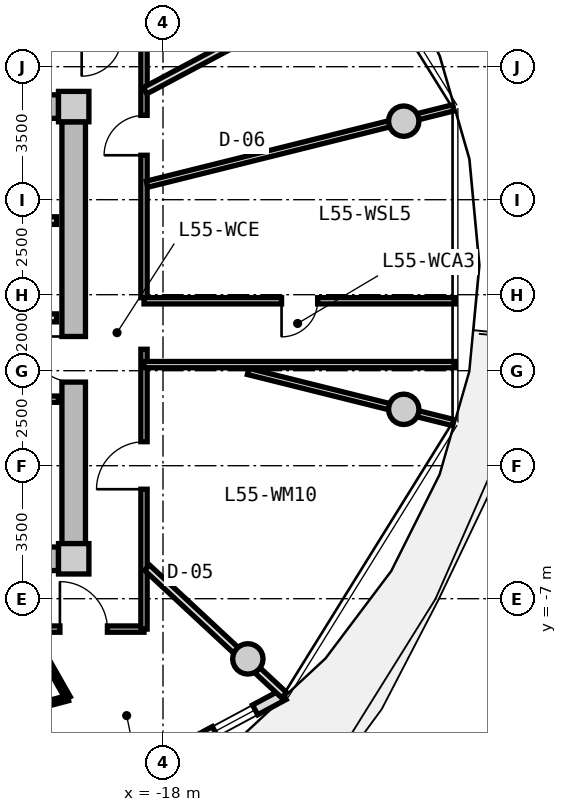
"""IFC4 building model, lengths in metres.
Left out: names, types, materials, properties, quantities, classifications, styles, units other than length and angle.
Written with IfcOpenShell. Run it as: python <this file> out.ifc"""

import sys

from ifc_helpers import new_model, si_unit, direction, frame, frame_2d, origin, origin_2d, place, context, subcontext, project, spatial, rectangle, circle, extrude, source, transform, mapped, element, fill, save


model = new_model("IFC4")
c1 = context("Model", 3, precision=1e-05, world=origin(), true_north=direction((0.0, 1.0)))
c2 = subcontext(c1, "Body", "Model", "MODEL_VIEW")
j1 = project(units=[si_unit("LENGTHUNIT", "METRE"), si_unit("PLANEANGLEUNIT", "RADIAN")], contexts=[c1])
p1 = place(None, origin())
s1 = spatial("IfcSite", under=j1, at=p1, CompositionType="ELEMENT")
p2 = place(p1, origin())
s2 = spatial("IfcBuilding", under=s1, at=p2, CompositionType="ELEMENT")
p3 = place(p2, frame((0.0, 0.0, 177.0)))
s3 = spatial("IfcBuildingStorey", under=s2, at=p3, CompositionType="ELEMENT", Elevation=177.0)
m1 = source(origin(), c2, "Body", "SweptSolid", [
    extrude(rectangle(XDim=0.8, YDim=0.8, at=origin_2d()), origin(), (0.0, 0.0, 1.0), 3.05),
])
for number, where, z_axis, x_axis in (
    (1, (-20.35, -5.95, 0.0), (0.0, 0.0, 1.0), (1.0, 0.0, 0.0)),
    (2, (-20.35, 5.95, 0.0), (0.0, 0.0, 1.0), (1.0, 0.0, 0.0)),
):
    element("IfcColumn", number, at=place(p3, frame(where, z_axis=z_axis, x_axis=x_axis)), inside=s3, PredefinedType="COLUMN", context=c2, shape_type="MappedRepresentation", body=[
        mapped(m1, transform((0.0, 0.0, 0.0), x_axis=(1.0, 0.0, 0.0), y_axis=(0.0, 1.0, 0.0), z_axis=(0.0, 0.0, 1.0), scale=1.0)),
    ])
m2 = source(origin(), c2, "Body", "SweptSolid", [
    extrude(rectangle(XDim=14.5, YDim=0.62, at=frame_2d((7.25, 0.0))), origin(), (0.0, 0.0, 1.0), 2.81),
])
for number, where, z_axis, x_axis in (
    (3, (-35.25, 5.95, 0.0), (0.0, 0.0, 1.0), (1.0, 0.0, 0.0)),
    (4, (-20.75, -5.95, 0.0), (0.0, 0.0, 1.0), (-1.0, 0.0, 0.0)),
):
    element("IfcWall", number, at=place(p3, frame(where, z_axis=z_axis, x_axis=x_axis)), inside=s3, PredefinedType="SHEAR", context=c2, shape_type="MappedRepresentation", body=[
        mapped(m2, transform((0.0, 0.0, 0.0), x_axis=(1.0, 0.0, 0.0), y_axis=(0.0, 1.0, 0.0), z_axis=(0.0, 0.0, 1.0), scale=1.0)),
    ])
m3 = source(origin(), c2, "Body", "SweptSolid", [
    extrude(rectangle(XDim=11.1, YDim=0.62, at=frame_2d((5.55, 0.0))), origin(), (0.0, 0.0, 1.0), 2.81),
])
p4 = place(p3, frame((-20.35, 5.55, 0.0), z_axis=(0.0, 0.0, 1.0), x_axis=(0.0, -1.0, 0.0)))
e5 = element("IfcWall", 5, at=p4, inside=s3, PredefinedType="SHEAR", context=c2, shape_type="MappedRepresentation", body=[
    mapped(m3, transform((0.0, 0.0, 0.0), x_axis=(1.0, 0.0, 0.0), y_axis=(0.0, 1.0, 0.0), z_axis=(0.0, 0.0, 1.0), scale=1.0)),
])
p5 = place(p4, frame((5.65, 0.0, 0.0)))
e6 = element("IfcOpeningElement", 6, at=p5, cuts=e5, PredefinedType="OPENING", context=c2, shape_type="SweptSolid", body=[
    extrude(rectangle(XDim=1.2, YDim=2.15, at=frame_2d((0.6, 1.075))), frame((0.0, 0.32, 0.0), z_axis=(0.0, -1.0, 0.0), x_axis=(1.0, 0.0, 0.0)), (0.0, 0.0, 1.0), 0.64),
])
m4 = source(origin(), c2, "Body", "SweptSolid", [
    extrude(circle(Radius=0.4, at=origin_2d()), origin(), (0.0, 0.0, 1.0), 3.05),
])
for number, where, z_axis, x_axis in (
    (7, (-11.665, 5.567, 0.0), (0.0, 0.0, 1.0), (1.0, 0.0, 0.0)),
    (8, (-15.767, -8.584, 0.0), (0.0, 0.0, 1.0), (1.0, 0.0, 0.0)),
    (9, (-11.665, -2.016, 0.0), (0.0, 0.0, 1.0), (1.0, 0.0, 0.0)),
):
    element("IfcColumn", number, at=place(p3, frame(where, z_axis=z_axis, x_axis=x_axis)), inside=s3, PredefinedType="COLUMN", context=c2, shape_type="MappedRepresentation", body=[
        mapped(m4, transform((0.0, 0.0, 0.0), x_axis=(1.0, 0.0, 0.0), y_axis=(0.0, 1.0, 0.0), z_axis=(0.0, 0.0, 1.0), scale=1.0)),
    ])
m5 = source(origin(), c2, "Body", "SweptSolid", [
    extrude(rectangle(XDim=8.742, YDim=0.29, at=frame_2d((4.371, 0.0))), origin(), (0.0, 0.0, 1.0), 2.81),
])
p6 = place(p3, frame((-14.827, -9.524, 0.0), z_axis=(0.0, 0.0, 1.0), x_axis=(-0.880998740657, -0.473118609823, 0.0)))
e10 = element("IfcWall", 10, at=p6, inside=s3, PredefinedType="SOLIDWALL", context=c2, shape_type="MappedRepresentation", body=[
    mapped(m5, transform((0.0, 0.0, 0.0), x_axis=(1.0, 0.0, 0.0), y_axis=(0.0, 1.0, 0.0), z_axis=(0.0, 0.0, 1.0), scale=1.0)),
])
p7 = place(p6, frame((6.66, 0.0, 0.0)))
e11 = element("IfcOpeningElement", 11, at=p7, cuts=e10, PredefinedType="OPENING", context=c2, shape_type="SweptSolid", body=[
    extrude(rectangle(XDim=1.15, YDim=2.25, at=frame_2d((0.575, 1.125))), frame((0.0, 0.155, 0.0), z_axis=(0.0, -1.0, 0.0), x_axis=(1.0, 0.0, 0.0)), (0.0, 0.0, 1.0), 0.31),
])
p8 = place(p6, frame((0.85, 0.0, 0.85)))
e12 = element("IfcOpeningElement", 12, at=p8, cuts=e10, PredefinedType="OPENING", context=c2, shape_type="SweptSolid", body=[
    extrude(rectangle(XDim=1.2, YDim=1.5, at=frame_2d((0.6, 0.75))), frame((0.0, 0.155, 0.0), z_axis=(0.0, -1.0, 0.0), x_axis=(1.0, 0.0, 0.0)), (0.0, 0.0, 1.0), 0.31),
])
m6 = source(origin(), c2, "Body", "SweptSolid", [
    extrude(rectangle(XDim=3.2, YDim=0.2, at=frame_2d((1.6, 0.0))), origin(), (0.0, 0.0, 1.0), 2.795),
])
p9 = place(p3, frame((-24.0, 2.95, 0.0), z_axis=(0.0, 0.0, 1.0), x_axis=(1.0, 0.0, 0.0)))
e13 = element("IfcWall", 13, at=p9, inside=s3, PredefinedType="PARTITIONING", context=c2, shape_type="MappedRepresentation", body=[
    mapped(m6, transform((0.0, 0.0, 0.0), x_axis=(1.0, 0.0, 0.0), y_axis=(0.0, 1.0, 0.0), z_axis=(0.0, 0.0, 1.0), scale=1.0)),
])
m7 = source(origin(), c2, "Body", "SweptSolid", [
    extrude(rectangle(XDim=6.66, YDim=0.21, at=frame_2d((3.33, 0.0))), origin(), (0.0, 0.0, 1.0), 2.795),
])
p10 = place(p3, frame((-27.46, 0.39, 0.0), z_axis=(0.0, 0.0, 1.0), x_axis=(1.0, 0.0, 0.0)))
e14 = element("IfcWall", 14, at=p10, inside=s3, PredefinedType="PARTITIONING", context=c2, shape_type="MappedRepresentation", body=[
    mapped(m7, transform((0.0, 0.0, 0.0), x_axis=(1.0, 0.0, 0.0), y_axis=(0.0, 1.0, 0.0), z_axis=(0.0, 0.0, 1.0), scale=1.0)),
])
p11 = place(p10, frame((1.0, 0.0, 0.0)))
e15 = element("IfcOpeningElement", 15, at=p11, cuts=e14, PredefinedType="OPENING", context=c2, shape_type="SweptSolid", body=[
    extrude(rectangle(XDim=1.2, YDim=2.15, at=frame_2d((0.6, 1.075))), frame((0.0, 0.115, 0.0), z_axis=(0.0, -1.0, 0.0), x_axis=(1.0, 0.0, 0.0)), (0.0, 0.0, 1.0), 0.23),
])
m8 = source(origin(), c2, "Body", "SweptSolid", [
    extrude(rectangle(XDim=2.7, YDim=0.165, at=frame_2d((1.35, 0.0))), origin(), (0.0, 0.0, 1.0), 2.795),
])
p12 = place(p3, frame((-23.45, -1.75, 0.0), z_axis=(0.0, 0.0, 1.0), x_axis=(1.0, 0.0, 0.0)))
e16 = element("IfcWall", 16, at=p12, inside=s3, PredefinedType="PARTITIONING", context=c2, shape_type="MappedRepresentation", body=[
    mapped(m8, transform((0.0, 0.0, 0.0), x_axis=(1.0, 0.0, 0.0), y_axis=(0.0, 1.0, 0.0), z_axis=(0.0, 0.0, 1.0), scale=1.0)),
])
p13 = place(p12, frame((0.85, 0.0, 0.0)))
e17 = element("IfcOpeningElement", 17, at=p13, cuts=e16, PredefinedType="OPENING", context=c2, shape_type="SweptSolid", body=[
    extrude(rectangle(XDim=0.925, YDim=2.1, at=frame_2d((0.462, 1.05))), frame((0.0, 0.093, 0.0), z_axis=(0.0, -1.0, 0.0), x_axis=(1.0, 0.0, 0.0)), (0.0, 0.0, 1.0), 0.185),
])
m9 = source(origin(), c2, "Body", "SweptSolid", [
    extrude(rectangle(XDim=19.0, YDim=0.165, at=frame_2d((9.5, 0.0))), origin(), (0.0, 0.0, 1.0), 2.795),
])
p14 = place(p3, frame((-18.5, -7.8, 0.0), z_axis=(0.0, 0.0, 1.0), x_axis=(-1.0, 0.0, 0.0)))
e18 = element("IfcWall", 18, at=p14, inside=s3, PredefinedType="PARTITIONING", context=c2, shape_type="MappedRepresentation", body=[
    mapped(m9, transform((0.0, 0.0, 0.0), x_axis=(1.0, 0.0, 0.0), y_axis=(0.0, 1.0, 0.0), z_axis=(0.0, 0.0, 1.0), scale=1.0)),
])
p15 = place(p14, frame((11.598, 0.0, 0.0)))
e19 = element("IfcOpeningElement", 19, at=p15, cuts=e18, PredefinedType="OPENING", context=c2, shape_type="SweptSolid", body=[
    extrude(rectangle(XDim=1.25, YDim=2.2, at=frame_2d((0.625, 1.1))), frame((0.0, 0.093, 0.0), z_axis=(0.0, -1.0, 0.0), x_axis=(1.0, 0.0, 0.0)), (0.0, 0.0, 1.0), 0.185),
])
p16 = place(p14, frame((0.963, 0.0, 0.0)))
e20 = element("IfcOpeningElement", 20, at=p16, cuts=e18, PredefinedType="OPENING", context=c2, shape_type="SweptSolid", body=[
    extrude(rectangle(XDim=1.25, YDim=2.2, at=frame_2d((0.625, 1.1))), frame((0.0, 0.093, 0.0), z_axis=(0.0, -1.0, 0.0), x_axis=(1.0, 0.0, 0.0)), (0.0, 0.0, 1.0), 0.185),
])
m10 = source(origin(), c2, "Body", "SweptSolid", [
    extrude(rectangle(XDim=6.88, YDim=0.165, at=frame_2d((3.44, 0.0))), origin(), (0.0, 0.0, 1.0), 2.795),
])
p17 = place(p3, frame((-18.5, 7.8, 0.0), z_axis=(0.0, 0.0, 1.0), x_axis=(0.0, -1.0, 0.0)))
e21 = element("IfcWall", 21, at=p17, inside=s3, PredefinedType="PARTITIONING", context=c2, shape_type="MappedRepresentation", body=[
    mapped(m10, transform((0.0, 0.0, 0.0), x_axis=(1.0, 0.0, 0.0), y_axis=(0.0, 1.0, 0.0), z_axis=(0.0, 0.0, 1.0), scale=1.0)),
])
p18 = place(p17, frame((2.081, 0.0, 0.0)))
e22 = element("IfcOpeningElement", 22, at=p18, cuts=e21, PredefinedType="OPENING", context=c2, shape_type="SweptSolid", body=[
    extrude(rectangle(XDim=1.05, YDim=2.15, at=frame_2d((0.525, 1.075))), frame((0.0, 0.093, 0.0), z_axis=(0.0, -1.0, 0.0), x_axis=(1.0, 0.0, 0.0)), (0.0, 0.0, 1.0), 0.185),
])
m11 = source(origin(), c2, "Body", "SweptSolid", [
    extrude(rectangle(XDim=7.365, YDim=0.165, at=frame_2d((3.682, 0.0))), origin(), (0.0, 0.0, 1.0), 2.795),
])
p19 = place(p3, frame((-18.5, -0.436, 0.0), z_axis=(0.0, 0.0, 1.0), x_axis=(0.0, -1.0, 0.0)))
e23 = element("IfcWall", 23, at=p19, inside=s3, PredefinedType="PARTITIONING", context=c2, shape_type="MappedRepresentation", body=[
    mapped(m11, transform((0.0, 0.0, 0.0), x_axis=(1.0, 0.0, 0.0), y_axis=(0.0, 1.0, 0.0), z_axis=(0.0, 0.0, 1.0), scale=1.0)),
])
p20 = place(p19, frame((2.433, 0.0, 0.0)))
e24 = element("IfcOpeningElement", 24, at=p20, cuts=e23, PredefinedType="OPENING", context=c2, shape_type="SweptSolid", body=[
    extrude(rectangle(XDim=1.25, YDim=2.2, at=frame_2d((0.625, 1.1))), frame((0.0, 0.093, 0.0), z_axis=(0.0, -1.0, 0.0), x_axis=(1.0, 0.0, 0.0)), (0.0, 0.0, 1.0), 0.185),
])
m12 = source(origin(), c2, "Body", "SweptSolid", [
    extrude(rectangle(XDim=5.564, YDim=0.165, at=frame_2d((2.782, 0.0))), origin(), (0.0, 0.0, 1.0), 2.345),
])
p21 = place(p3, frame((-15.76, -1.02, 0.0), z_axis=(0.0, 0.0, 1.0), x_axis=(0.970315176167, -0.241843872984, 0.0)))
e25 = element("IfcWall", 25, at=p21, inside=s3, PredefinedType="PARTITIONING", context=c2, shape_type="MappedRepresentation", body=[
    mapped(m12, transform((0.0, 0.0, 0.0), x_axis=(1.0, 0.0, 0.0), y_axis=(0.0, 1.0, 0.0), z_axis=(0.0, 0.0, 1.0), scale=1.0)),
])
m13 = source(origin(), c2, "Body", "SweptSolid", [
    extrude(rectangle(XDim=8.305, YDim=0.165, at=frame_2d((4.153, 0.0))), origin(), (0.0, 0.0, 1.0), 2.345),
])
p22 = place(p3, frame((-18.42, 3.908, 0.0), z_axis=(0.0, 0.0, 1.0), x_axis=(0.970309994378, 0.241864662175, 0.0)))
e26 = element("IfcWall", 26, at=p22, inside=s3, PredefinedType="PARTITIONING", context=c2, shape_type="MappedRepresentation", body=[
    mapped(m13, transform((0.0, 0.0, 0.0), x_axis=(1.0, 0.0, 0.0), y_axis=(0.0, 1.0, 0.0), z_axis=(0.0, 0.0, 1.0), scale=1.0)),
])
m14 = source(origin(), c2, "Body", "SweptSolid", [
    extrude(rectangle(XDim=8.189, YDim=0.165, at=frame_2d((4.094, 0.0))), origin(), (0.0, 0.0, 1.0), 2.795),
])
p23 = place(p3, frame((-18.5, 0.84, 0.0), z_axis=(0.0, 0.0, 1.0), x_axis=(1.0, 0.0, 0.0)))
e27 = element("IfcWall", 27, at=p23, inside=s3, PredefinedType="PARTITIONING", context=c2, shape_type="MappedRepresentation", body=[
    mapped(m14, transform((0.0, 0.0, 0.0), x_axis=(1.0, 0.0, 0.0), y_axis=(0.0, 1.0, 0.0), z_axis=(0.0, 0.0, 1.0), scale=1.0)),
])
p24 = place(p23, frame((3.619, 0.0, 0.0)))
e28 = element("IfcOpeningElement", 28, at=p24, cuts=e27, PredefinedType="OPENING", context=c2, shape_type="SweptSolid", body=[
    extrude(rectangle(XDim=0.95, YDim=2.1, at=frame_2d((0.475, 1.05))), frame((0.0, 0.093, 0.0), z_axis=(0.0, -1.0, 0.0), x_axis=(1.0, 0.0, 0.0)), (0.0, 0.0, 1.0), 0.185),
])
p25 = place(p3, frame((-10.311, -0.84, 0.0), z_axis=(0.0, 0.0, 1.0), x_axis=(-1.0, 0.0, 0.0)))
e29 = element("IfcWall", 29, at=p25, inside=s3, PredefinedType="PARTITIONING", context=c2, shape_type="MappedRepresentation", body=[
    mapped(m14, transform((0.0, 0.0, 0.0), x_axis=(1.0, 0.0, 0.0), y_axis=(0.0, 1.0, 0.0), z_axis=(0.0, 0.0, 1.0), scale=1.0)),
])
m15 = source(origin(), c2, "Body", "SweptSolid", [
    extrude(rectangle(XDim=6.665, YDim=0.19, at=frame_2d((3.333, 0.0))), origin(), (0.0, 0.0, 1.0), 2.795),
])
p26 = place(p3, frame((-18.47, 6.37, 0.0), z_axis=(0.0, 0.0, 1.0), x_axis=(0.88263769619, 0.470053930166, 0.0)))
e30 = element("IfcWall", 30, at=p26, inside=s3, PredefinedType="PARTITIONING", context=c2, shape_type="MappedRepresentation", body=[
    mapped(m15, transform((0.0, 0.0, 0.0), x_axis=(1.0, 0.0, 0.0), y_axis=(0.0, 1.0, 0.0), z_axis=(0.0, 0.0, 1.0), scale=1.0)),
])
m16 = source(origin(), c2, "Body", "SweptSolid", [
    extrude(rectangle(XDim=4.927, YDim=0.19, at=frame_2d((2.463, 0.0))), origin(), (0.0, 0.0, 1.0), 2.345),
])
p27 = place(p3, frame((-18.42, -6.183, 0.0), z_axis=(0.0, 0.0, 1.0), x_axis=(0.732191335987, -0.681098999783, 0.0)))
e31 = element("IfcWall", 31, at=p27, inside=s3, PredefinedType="PARTITIONING", context=c2, shape_type="MappedRepresentation", body=[
    mapped(m16, transform((0.0, 0.0, 0.0), x_axis=(1.0, 0.0, 0.0), y_axis=(0.0, 1.0, 0.0), z_axis=(0.0, 0.0, 1.0), scale=1.0)),
])
m17 = source(origin(), c2, "Body", "SweptSolid", [
    extrude(rectangle(XDim=2.055, YDim=0.14, at=frame_2d((1.027, 0.0))), origin(), (0.0, 0.0, 1.0), 2.795),
])
p28 = place(p3, frame((-21.516, -7.83, 0.0), z_axis=(0.0, 0.0, 1.0), x_axis=(0.494154336367, -0.869374195528, 0.0)))
e32 = element("IfcWall", 32, at=p28, inside=s3, PredefinedType="PARTITIONING", context=c2, shape_type="MappedRepresentation", body=[
    mapped(m17, transform((0.0, 0.0, 0.0), x_axis=(1.0, 0.0, 0.0), y_axis=(0.0, 1.0, 0.0), z_axis=(0.0, 0.0, 1.0), scale=1.0)),
])
m18 = source(origin(), c2, "Body", "SweptSolid", [
    extrude(rectangle(XDim=3.088, YDim=0.14, at=frame_2d((1.544, 0.0))), origin(), (0.0, 0.0, 1.0), 2.795),
])
p29 = place(p3, frame((-20.501, -9.616, 0.0), z_axis=(0.0, 0.0, 1.0), x_axis=(-0.967224898254, -0.253921240146, 0.0)))
e33 = element("IfcWall", 33, at=p29, inside=s3, PredefinedType="PARTITIONING", context=c2, shape_type="MappedRepresentation", body=[
    mapped(m18, transform((0.0, 0.0, 0.0), x_axis=(1.0, 0.0, 0.0), y_axis=(0.0, 1.0, 0.0), z_axis=(0.0, 0.0, 1.0), scale=1.0)),
])
p30 = place(p29, frame((1.084, 0.0, 0.0)))
e34 = element("IfcOpeningElement", 34, at=p30, cuts=e33, PredefinedType="OPENING", context=c2, shape_type="SweptSolid", body=[
    extrude(rectangle(XDim=0.92, YDim=2.1, at=frame_2d((0.46, 1.05))), frame((0.0, 0.08, 0.0), z_axis=(0.0, -1.0, 0.0), x_axis=(1.0, 0.0, 0.0)), (0.0, 0.0, 1.0), 0.16),
])
m19 = source(origin(), c2, "Body", "SweptSolid", [
    extrude(rectangle(XDim=1.2, YDim=1.5, at=frame_2d((0.6, 0.75))), frame((0.0, 0.03, 0.0), z_axis=(0.0, -1.0, 0.0), x_axis=(1.0, 0.0, 0.0)), (0.0, 0.0, 1.0), 0.06),
])
p31 = place(p8, origin())
e35 = element("IfcWindow", 35, at=p31, inside=s3, PartitioningType="SINGLE_PANEL", PredefinedType="WINDOW", context=c2, shape_type="MappedRepresentation", body=[
    mapped(m19, transform((0.0, 0.0, 0.0), x_axis=(1.0, 0.0, 0.0), y_axis=(0.0, 1.0, 0.0), z_axis=(0.0, 0.0, 1.0), scale=1.0)),
])
fill(e12, e35)
m20 = source(origin(), c2, "Body", "SweptSolid", [
    extrude(rectangle(XDim=1.2, YDim=2.15, at=frame_2d((0.6, 1.075))), frame((0.0, 0.025, 0.0), z_axis=(0.0, -1.0, 0.0), x_axis=(1.0, 0.0, 0.0)), (0.0, 0.0, 1.0), 0.05),
])
p32 = place(p5, frame((1.2, 0.0, 0.0), z_axis=(0.0, 0.0, 1.0), x_axis=(-1.0, 0.0, 0.0)))
e36 = element("IfcDoor", 36, at=p32, inside=s3, OperationType="SINGLE_SWING_RIGHT", PredefinedType="DOOR", context=c2, shape_type="MappedRepresentation", body=[
    mapped(m20, transform((0.0, 0.0, 0.0), x_axis=(1.0, 0.0, 0.0), y_axis=(0.0, 1.0, 0.0), z_axis=(0.0, 0.0, 1.0), scale=1.0)),
])
fill(e6, e36)
m21 = source(origin(), c2, "Body", "SweptSolid", [
    extrude(rectangle(XDim=0.95, YDim=2.1, at=frame_2d((0.475, 1.05))), frame((0.0, 0.025, 0.0), z_axis=(0.0, -1.0, 0.0), x_axis=(1.0, 0.0, 0.0)), (0.0, 0.0, 1.0), 0.05),
])
p33 = place(p24, frame((0.95, 0.0, 0.0), z_axis=(0.0, 0.0, 1.0), x_axis=(-1.0, 0.0, 0.0)))
e37 = element("IfcDoor", 37, at=p33, inside=s3, OperationType="SINGLE_SWING_RIGHT", PredefinedType="DOOR", context=c2, shape_type="MappedRepresentation", body=[
    mapped(m21, transform((0.0, 0.0, 0.0), x_axis=(1.0, 0.0, 0.0), y_axis=(0.0, 1.0, 0.0), z_axis=(0.0, 0.0, 1.0), scale=1.0)),
])
fill(e28, e37)
m22 = source(origin(), c2, "Body", "SweptSolid", [
    extrude(rectangle(XDim=1.05, YDim=2.15, at=frame_2d((0.525, 1.075))), frame((0.0, 0.025, 0.0), z_axis=(0.0, -1.0, 0.0), x_axis=(1.0, 0.0, 0.0)), (0.0, 0.0, 1.0), 0.05),
])
p34 = place(p18, frame((1.05, 0.0, 0.0), z_axis=(0.0, 0.0, 1.0), x_axis=(-1.0, 0.0, 0.0)))
e38 = element("IfcDoor", 38, at=p34, inside=s3, OperationType="SINGLE_SWING_LEFT", PredefinedType="DOOR", context=c2, shape_type="MappedRepresentation", body=[
    mapped(m22, transform((0.0, 0.0, 0.0), x_axis=(1.0, 0.0, 0.0), y_axis=(0.0, 1.0, 0.0), z_axis=(0.0, 0.0, 1.0), scale=1.0)),
])
fill(e22, e38)
m23 = source(origin(), c2, "Body", "SweptSolid", [
    extrude(rectangle(XDim=1.25, YDim=2.2, at=frame_2d((0.625, 1.1))), frame((0.0, 0.025, 0.0), z_axis=(0.0, -1.0, 0.0), x_axis=(1.0, 0.0, 0.0)), (0.0, 0.0, 1.0), 0.05),
])
p35 = place(p16, frame((1.25, 0.0, 0.0), z_axis=(0.0, 0.0, 1.0), x_axis=(-1.0, 0.0, 0.0)))
e39 = element("IfcDoor", 39, at=p35, inside=s3, OperationType="SINGLE_SWING_LEFT", PredefinedType="DOOR", context=c2, shape_type="MappedRepresentation", body=[
    mapped(m23, transform((0.0, 0.0, 0.0), x_axis=(1.0, 0.0, 0.0), y_axis=(0.0, 1.0, 0.0), z_axis=(0.0, 0.0, 1.0), scale=1.0)),
])
fill(e20, e39)
p36 = place(p20, frame((1.25, 0.0, 0.0), z_axis=(0.0, 0.0, 1.0), x_axis=(-1.0, 0.0, 0.0)))
e40 = element("IfcDoor", 40, at=p36, inside=s3, OperationType="SINGLE_SWING_LEFT", PredefinedType="DOOR", context=c2, shape_type="MappedRepresentation", body=[
    mapped(m23, transform((0.0, 0.0, 0.0), x_axis=(1.0, 0.0, 0.0), y_axis=(0.0, 1.0, 0.0), z_axis=(0.0, 0.0, 1.0), scale=1.0)),
])
fill(e24, e40)
save(model, sys.argv[1])
